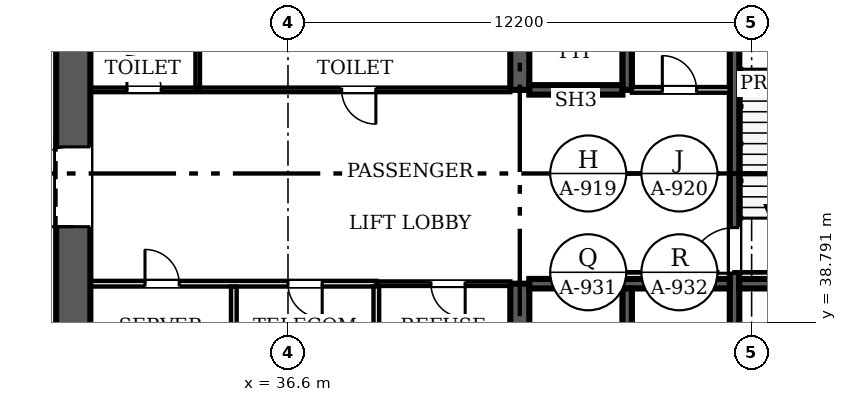
"""IFC4 building model, lengths in metres.
Left out: names, types, materials, properties, quantities, classifications, styles, units other than length and angle.
Written with IfcOpenShell. Run it as: python <this file> out.ifc"""

import sys

from ifc_helpers import new_model, si_unit, direction, frame, frame_2d, origin, place, context, subcontext, project, spatial, rectangle, extrude, source, transform, mapped, element, fill, save


model = new_model("IFC4")
c1 = context("Model", 3, precision=1e-05, world=origin(), true_north=direction((0.0, 1.0)))
c2 = subcontext(c1, "Body", "Model", "MODEL_VIEW")
j1 = project(units=[si_unit("LENGTHUNIT", "METRE"), si_unit("PLANEANGLEUNIT", "RADIAN")], contexts=[c1])
p1 = place(None, origin())
s1 = spatial("IfcSite", under=j1, at=p1, CompositionType="ELEMENT")
p2 = place(p1, origin())
s2 = spatial("IfcBuilding", under=s1, at=p2, CompositionType="ELEMENT")
p3 = place(p2, frame((0.0, 0.0, -5.4)))
s3 = spatial("IfcBuildingStorey", under=s2, at=p3, CompositionType="ELEMENT", Elevation=-5.4)
p4 = place(p3, frame((30.95, 25.3, 0.0), z_axis=(0.0, 0.0, 1.0), x_axis=(0.0, 1.0, 0.0)))
e1 = element("IfcWall", 1, at=p4, inside=s3, PredefinedType="SHEAR", context=c2, shape_type="SweptSolid", body=[
    extrude(rectangle(XDim=22.6, YDim=0.9, at=frame_2d((11.3, 0.0))), origin(), (0.0, 0.0, 1.0), 5.4),
])
m1 = source(origin(), c2, "Body", "SweptSolid", [
    extrude(rectangle(XDim=2.1, YDim=2.4, at=frame_2d((1.05, 1.2))), frame((0.0, 0.46, 0.0), z_axis=(0.0, -1.0, 0.0), x_axis=(1.0, 0.0, 0.0)), (0.0, 0.0, 1.0), 0.92),
])
p5 = place(p4, frame((4.5, 0.0, 0.0)))
e2 = element("IfcOpeningElement", 2, at=p5, cuts=e1, PredefinedType="OPENING", context=c2, shape_type="MappedRepresentation", body=[
    mapped(m1, transform((0.0, 0.0, 0.0), scale=1.0)),
])
p6 = place(p4, frame((16.0, 0.0, 0.0)))
e3 = element("IfcOpeningElement", 3, at=p6, cuts=e1, PredefinedType="OPENING", context=c2, shape_type="MappedRepresentation", body=[
    mapped(m1, transform((0.0, 0.0, 0.0), scale=1.0)),
])
p7 = place(p3, frame((42.7, 36.85, 0.0), z_axis=(0.0, 0.0, 1.0), x_axis=(0.0, 1.0, 0.0)))
e4 = element("IfcWall", 4, at=p7, inside=s3, PredefinedType="SHEAR", context=c2, shape_type="SweptSolid", body=[
    extrude(rectangle(XDim=2.95, YDim=0.5, at=frame_2d((1.475, 0.0))), origin(), (0.0, 0.0, 1.0), 5.4),
])
p8 = place(p3, frame((42.7, 44.9, 0.0), z_axis=(0.0, 0.0, 1.0), x_axis=(0.0, 1.0, 0.0)))
e5 = element("IfcWall", 5, at=p8, inside=s3, PredefinedType="SHEAR", context=c2, shape_type="SweptSolid", body=[
    extrude(rectangle(XDim=3.0, YDim=0.5, at=frame_2d((1.5, 0.0))), origin(), (0.0, 0.0, 1.0), 5.4),
])
p9 = place(p3, frame((48.35, 47.9, 0.0), z_axis=(0.0, 0.0, 1.0), x_axis=(0.0, -1.0, 0.0)))
e6 = element("IfcWall", 6, at=p9, inside=s3, PredefinedType="SOLIDWALL", context=c2, shape_type="SweptSolid", body=[
    extrude(rectangle(XDim=11.05, YDim=0.25, at=frame_2d((5.525, 0.0))), origin(), (0.0, 0.0, 1.0), 5.4),
])
m2 = source(origin(), c2, "Body", "SweptSolid", [
    extrude(rectangle(XDim=1.2, YDim=2.1, at=frame_2d((0.6, 1.05))), frame((0.0, 0.135, 0.0), z_axis=(0.0, -1.0, 0.0), x_axis=(1.0, 0.0, 0.0)), (0.0, 0.0, 1.0), 0.27),
])
p10 = place(p9, frame((6.625, 0.0, 0.0)))
e7 = element("IfcOpeningElement", 7, at=p10, cuts=e6, PredefinedType="OPENING", context=c2, shape_type="MappedRepresentation", body=[
    mapped(m2, transform((0.0, 0.0, 0.0), scale=1.0)),
])
p11 = place(p3, frame((42.95, 39.8, 0.0), z_axis=(0.0, 0.0, 1.0), x_axis=(1.0, 0.0, 0.0)))
e8 = element("IfcWall", 8, at=p11, inside=s3, PredefinedType="SOLIDWALL", context=c2, shape_type="SweptSolid", body=[
    extrude(rectangle(XDim=5.275, YDim=0.25, at=frame_2d((2.638, 0.0))), origin(), (0.0, 0.0, 1.0), 5.4),
])
p12 = place(p3, frame((48.475, 39.8, 0.0), z_axis=(0.0, 0.0, 1.0), x_axis=(1.0, 0.0, 0.0)))
e9 = element("IfcWall", 9, at=p12, inside=s3, PredefinedType="SOLIDWALL", context=c2, shape_type="SweptSolid", body=[
    extrude(rectangle(XDim=3.525, YDim=0.25, at=frame_2d((1.762, 0.0))), origin(), (0.0, 0.0, 1.0), 5.4),
])
p13 = place(p3, frame((45.525, 36.85, 0.0), z_axis=(0.0, 0.0, 1.0), x_axis=(0.0, 1.0, 0.0)))
e10 = element("IfcWall", 10, at=p13, inside=s3, PredefinedType="SOLIDWALL", context=c2, shape_type="SweptSolid", body=[
    extrude(rectangle(XDim=2.825, YDim=0.25, at=frame_2d((1.413, 0.0))), origin(), (0.0, 0.0, 1.0), 5.4),
])
p14 = place(p3, frame((45.525, 44.9, 0.0), z_axis=(0.0, 0.0, 1.0), x_axis=(0.0, 1.0, 0.0)))
e11 = element("IfcWall", 11, at=p14, inside=s3, PredefinedType="SOLIDWALL", context=c2, shape_type="SweptSolid", body=[
    extrude(rectangle(XDim=3.0, YDim=0.25, at=frame_2d((1.5, 0.0))), origin(), (0.0, 0.0, 1.0), 5.4),
])
p15 = place(p3, frame((42.95, 44.9, 0.0), z_axis=(0.0, 0.0, 1.0), x_axis=(1.0, 0.0, 0.0)))
e12 = element("IfcWall", 12, at=p15, inside=s3, PredefinedType="SOLIDWALL", context=c2, shape_type="SweptSolid", body=[
    extrude(rectangle(XDim=2.45, YDim=0.25, at=frame_2d((1.225, 0.0))), origin(), (0.0, 0.0, 1.0), 5.4),
])
p16 = place(p3, frame((31.4, 44.9, 0.0), z_axis=(0.0, 0.0, 1.0), x_axis=(1.0, 0.0, 0.0)))
e13 = element("IfcWall", 13, at=p16, inside=s3, PredefinedType="PARTITIONING", context=c2, shape_type="SweptSolid", body=[
    extrude(rectangle(XDim=11.05, YDim=0.12, at=frame_2d((5.525, 0.0))), origin(), (0.0, 0.0, 1.0), 5.15),
])
m3 = source(origin(), c2, "Body", "SweptSolid", [
    extrude(rectangle(XDim=0.9, YDim=2.1, at=frame_2d((0.45, 1.05))), frame((0.0, 0.07, 0.0), z_axis=(0.0, -1.0, 0.0), x_axis=(1.0, 0.0, 0.0)), (0.0, 0.0, 1.0), 0.14),
])
p17 = place(p16, frame((0.962, 0.0, 0.0)))
e14 = element("IfcOpeningElement", 14, at=p17, cuts=e13, PredefinedType="OPENING", context=c2, shape_type="MappedRepresentation", body=[
    mapped(m3, transform((0.0, 0.0, 0.0), scale=1.0)),
])
p18 = place(p16, frame((6.613, 0.0, 0.0)))
e15 = element("IfcOpeningElement", 15, at=p18, cuts=e13, PredefinedType="OPENING", context=c2, shape_type="MappedRepresentation", body=[
    mapped(m3, transform((0.0, 0.0, 0.0), scale=1.0)),
])
p19 = place(p3, frame((38.925, 39.8, 0.0), z_axis=(0.0, 0.0, 1.0), x_axis=(-1.0, 0.0, 0.0)))
e16 = element("IfcWall", 16, at=p19, inside=s3, PredefinedType="PARTITIONING", context=c2, shape_type="SweptSolid", body=[
    extrude(rectangle(XDim=7.525, YDim=0.15, at=frame_2d((3.763, 0.0))), origin(), (0.0, 0.0, 1.0), 5.15),
])
m4 = source(origin(), c2, "Body", "SweptSolid", [
    extrude(rectangle(XDim=0.9, YDim=2.1, at=frame_2d((0.45, 1.05))), frame((0.0, 0.085, 0.0), z_axis=(0.0, -1.0, 0.0), x_axis=(1.0, 0.0, 0.0)), (0.0, 0.0, 1.0), 0.17),
])
p20 = place(p19, frame((5.188, 0.0, 0.0)))
e17 = element("IfcOpeningElement", 17, at=p20, cuts=e16, PredefinedType="OPENING", context=c2, shape_type="MappedRepresentation", body=[
    mapped(m4, transform((0.0, 0.0, 0.0), scale=1.0)),
])
p21 = place(p19, frame((1.425, 0.0, 0.0)))
e18 = element("IfcOpeningElement", 18, at=p21, cuts=e16, PredefinedType="OPENING", context=c2, shape_type="MappedRepresentation", body=[
    mapped(m4, transform((0.0, 0.0, 0.0), scale=1.0)),
])
p22 = place(p3, frame((42.45, 39.8, 0.0), z_axis=(0.0, 0.0, 1.0), x_axis=(-1.0, 0.0, 0.0)))
e19 = element("IfcWall", 19, at=p22, inside=s3, PredefinedType="PARTITIONING", context=c2, shape_type="SweptSolid", body=[
    extrude(rectangle(XDim=3.525, YDim=0.12, at=frame_2d((1.762, 0.0))), origin(), (0.0, 0.0, 1.0), 5.15),
])
p23 = place(p22, frame((1.188, 0.0, 0.0)))
e20 = element("IfcOpeningElement", 20, at=p23, cuts=e19, PredefinedType="OPENING", context=c2, shape_type="MappedRepresentation", body=[
    mapped(m3, transform((0.0, 0.0, 0.0), scale=1.0)),
])
for number, where, z_axis, x_axis in (
    (21, (35.175, 36.85, 0.0), (0.0, 0.0, 1.0), (0.0, 1.0, 0.0)),
    (22, (38.925, 36.85, 0.0), (0.0, 0.0, 1.0), (0.0, 1.0, 0.0)),
):
    element("IfcWall", number, at=place(p3, frame(where, z_axis=z_axis, x_axis=x_axis)), inside=s3, PredefinedType="PARTITIONING", context=c2, shape_type="SweptSolid", body=[
        extrude(rectangle(XDim=2.875, YDim=0.15, at=frame_2d((1.438, 0.0))), origin(), (0.0, 0.0, 1.0), 5.15),
    ])
p24 = place(p3, frame((34.225, 44.96, 0.0), z_axis=(0.0, 0.0, 1.0), x_axis=(0.0, 1.0, 0.0)))
e23 = element("IfcWall", 23, at=p24, inside=s3, PredefinedType="PARTITIONING", context=c2, shape_type="SweptSolid", body=[
    extrude(rectangle(XDim=2.94, YDim=0.12, at=frame_2d((1.47, 0.0))), origin(), (0.0, 0.0, 1.0), 5.15),
])
p25 = place(p3, frame((45.65, 44.9, 0.0), z_axis=(0.0, 0.0, 1.0), x_axis=(1.0, 0.0, 0.0)))
e24 = element("IfcWall", 24, at=p25, inside=s3, PredefinedType="PARTITIONING", context=c2, shape_type="SweptSolid", body=[
    extrude(rectangle(XDim=2.575, YDim=0.15, at=frame_2d((1.288, 0.0))), origin(), (0.0, 0.0, 1.0), 5.15),
])
p26 = place(p25, frame((0.8, 0.0, 0.0)))
e25 = element("IfcOpeningElement", 25, at=p26, cuts=e24, PredefinedType="OPENING", context=c2, shape_type="MappedRepresentation", body=[
    mapped(m4, transform((0.0, 0.0, 0.0), scale=1.0)),
])
m5 = source(origin(), c2, "Body", "SweptSolid", [
    extrude(rectangle(XDim=2.1, YDim=2.4, at=frame_2d((1.05, 1.2))), frame((0.0, 0.025, 0.0), z_axis=(0.0, -1.0, 0.0), x_axis=(1.0, 0.0, 0.0)), (0.0, 0.0, 1.0), 0.05),
])
p27 = place(p6, origin())
e26 = element("IfcDoor", 26, at=p27, inside=s3, OperationType="DOUBLE_DOOR_SINGLE_SWING", PredefinedType="DOOR", context=c2, shape_type="MappedRepresentation", body=[
    mapped(m5, transform((0.0, 0.0, 0.0), scale=1.0)),
])
fill(e3, e26)
m6 = source(origin(), c2, "Body", "SweptSolid", [
    extrude(rectangle(XDim=1.2, YDim=2.1, at=frame_2d((0.6, 1.05))), frame((0.0, 0.025, 0.0), z_axis=(0.0, -1.0, 0.0), x_axis=(1.0, 0.0, 0.0)), (0.0, 0.0, 1.0), 0.05),
])
p28 = place(p10, origin())
e27 = element("IfcDoor", 27, at=p28, inside=s3, OperationType="SINGLE_SWING_RIGHT", PredefinedType="DOOR", context=c2, shape_type="MappedRepresentation", body=[
    mapped(m6, transform((0.0, 0.0, 0.0), scale=1.0)),
])
fill(e7, e27)
m7 = source(origin(), c2, "Body", "SweptSolid", [
    extrude(rectangle(XDim=0.9, YDim=2.1, at=frame_2d((0.45, 1.05))), frame((0.0, 0.025, 0.0), z_axis=(0.0, -1.0, 0.0), x_axis=(1.0, 0.0, 0.0)), (0.0, 0.0, 1.0), 0.05),
])
p29 = place(p17, origin())
e28 = element("IfcDoor", 28, at=p29, inside=s3, OperationType="SINGLE_SWING_LEFT", PredefinedType="DOOR", context=c2, shape_type="MappedRepresentation", body=[
    mapped(m7, transform((0.0, 0.0, 0.0), scale=1.0)),
])
fill(e14, e28)
p30 = place(p18, origin())
e29 = element("IfcDoor", 29, at=p30, inside=s3, OperationType="SINGLE_SWING_RIGHT", PredefinedType="DOOR", context=c2, shape_type="MappedRepresentation", body=[
    mapped(m7, transform((0.0, 0.0, 0.0), scale=1.0)),
])
fill(e15, e29)
p31 = place(p20, origin())
e30 = element("IfcDoor", 30, at=p31, inside=s3, OperationType="SINGLE_SWING_RIGHT", PredefinedType="DOOR", context=c2, shape_type="MappedRepresentation", body=[
    mapped(m7, transform((0.0, 0.0, 0.0), scale=1.0)),
])
fill(e17, e30)
p32 = place(p21, origin())
e31 = element("IfcDoor", 31, at=p32, inside=s3, OperationType="SINGLE_SWING_LEFT", PredefinedType="DOOR", context=c2, shape_type="MappedRepresentation", body=[
    mapped(m7, transform((0.0, 0.0, 0.0), scale=1.0)),
])
fill(e18, e31)
p33 = place(p23, origin())
e32 = element("IfcDoor", 32, at=p33, inside=s3, OperationType="SINGLE_SWING_LEFT", PredefinedType="DOOR", context=c2, shape_type="MappedRepresentation", body=[
    mapped(m7, transform((0.0, 0.0, 0.0), scale=1.0)),
])
fill(e20, e32)
p34 = place(p26, origin())
e33 = element("IfcDoor", 33, at=p34, inside=s3, OperationType="SINGLE_SWING_LEFT", PredefinedType="DOOR", context=c2, shape_type="MappedRepresentation", body=[
    mapped(m7, transform((0.0, 0.0, 0.0), scale=1.0)),
])
fill(e25, e33)
save(model, sys.argv[1])
